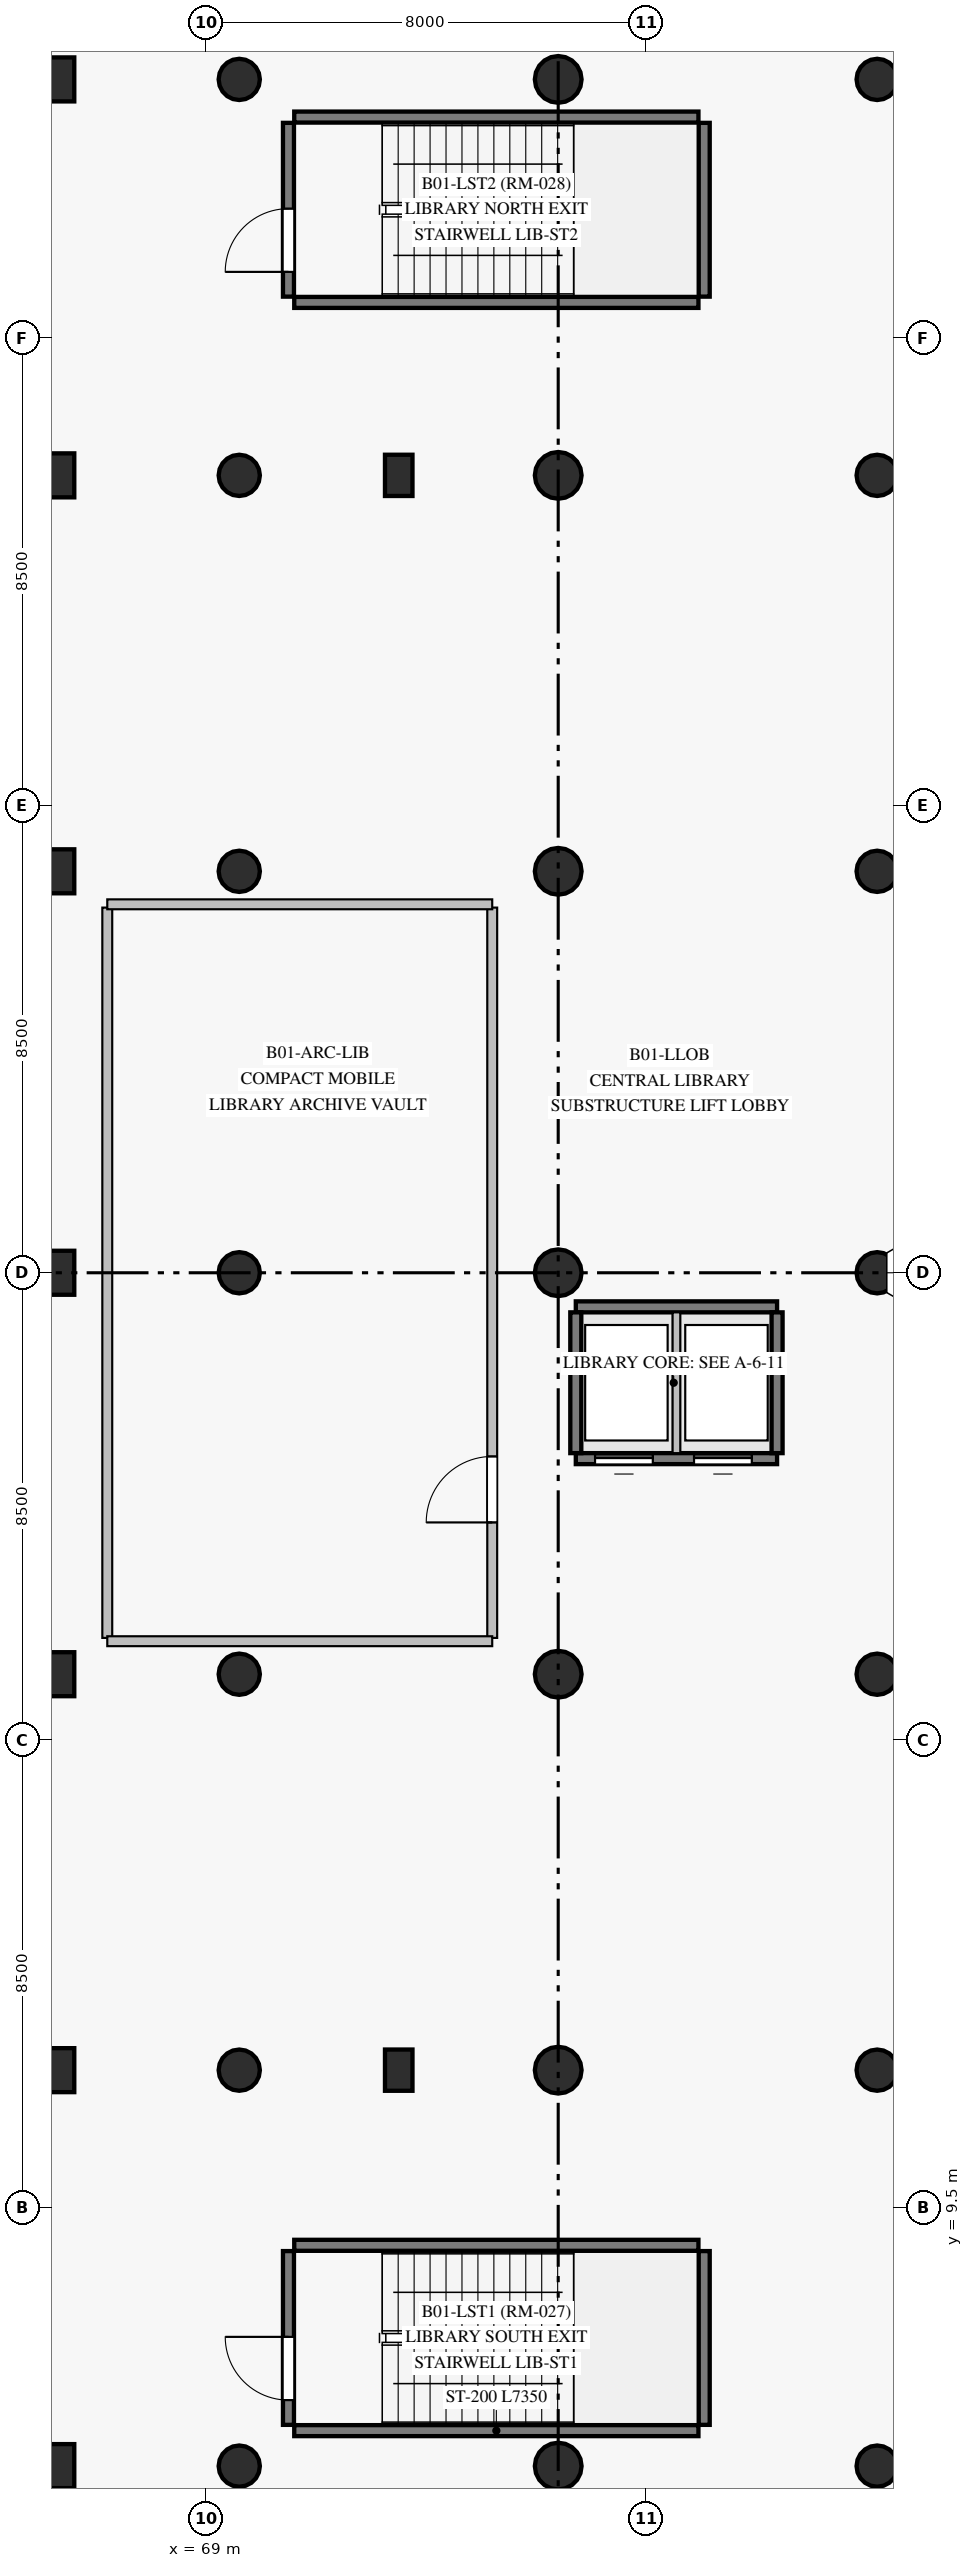
"""IFC4 building model, lengths in metres.
Left out: names, types, materials, properties, quantities, classifications, styles, units other than length and angle.
Written with IfcOpenShell. Run it as: python <this file> out.ifc"""

import sys

from ifc_helpers import new_model, si_unit, direction, frame, frame_2d, origin, origin_with_axes, origin_2d, place, context, subcontext, project, spatial, rectangle, circle, extrude, source, transform, mapped, element, fill, save


model = new_model("IFC4")
c1 = context("Model", 3, precision=1e-05, world=origin(), true_north=direction((0.0, 1.0)))
c2 = subcontext(c1, "Body", "Model", "MODEL_VIEW")
j1 = project(units=[si_unit("LENGTHUNIT", "METRE"), si_unit("PLANEANGLEUNIT", "RADIAN")], contexts=[c1])
p1 = place(None, origin())
s1 = spatial("IfcSite", under=j1, at=p1, CompositionType="ELEMENT")
p2 = place(p1, origin())
s2 = spatial("IfcBuilding", under=s1, at=p2, CompositionType="ELEMENT")
p3 = place(p2, frame((0.0, 0.0, -4.2)))
s3 = spatial("IfcBuildingStorey", under=s2, at=p3, CompositionType="ELEMENT", Elevation=-4.2)
m1 = source(origin_with_axes(), c2, "Body", "SweptSolid", [
    extrude(circle(Radius=0.375, at=origin_2d()), origin(), (0.0, 0.0, 1.0), 4.2),
])
for number, where, z_axis, x_axis in (
    (1, (69.6, 4.8, 0.0), (0.0, 0.0, 1.0), (1.0, 0.0, 0.0)),
    (2, (69.6, 12.0, 0.0), (0.0, 0.0, 1.0), (1.0, 0.0, 0.0)),
    (3, (69.6, 19.2, 0.0), (0.0, 0.0, 1.0), (1.0, 0.0, 0.0)),
    (4, (69.6, 26.5, 0.0), (0.0, 0.0, 1.0), (1.0, 0.0, 0.0)),
    (5, (69.6, 33.8, 0.0), (0.0, 0.0, 1.0), (1.0, 0.0, 0.0)),
    (6, (69.6, 41.0, 0.0), (0.0, 0.0, 1.0), (1.0, 0.0, 0.0)),
    (7, (69.6, 48.2, 0.0), (0.0, 0.0, 1.0), (1.0, 0.0, 0.0)),
):
    element("IfcColumn", number, at=place(p3, frame(where, z_axis=z_axis, x_axis=x_axis)), inside=s3, PredefinedType="COLUMN", context=c2, shape_type="MappedRepresentation", body=[
        mapped(m1, transform((0.0, 0.0, 0.0), scale=1.0)),
    ])
m2 = source(origin_with_axes(), c2, "Body", "SweptSolid", [
    extrude(circle(Radius=0.425, at=origin_2d()), origin(), (0.0, 0.0, 1.0), 4.2),
])
for number, where, z_axis, x_axis in (
    (8, (75.4, 4.8, 0.0), (0.0, 0.0, 1.0), (1.0, 0.0, 0.0)),
    (9, (75.4, 12.0, 0.0), (0.0, 0.0, 1.0), (1.0, 0.0, 0.0)),
    (10, (75.4, 19.2, 0.0), (0.0, 0.0, 1.0), (1.0, 0.0, 0.0)),
    (11, (75.4, 26.5, 0.0), (0.0, 0.0, 1.0), (1.0, 0.0, 0.0)),
    (12, (75.4, 33.8, 0.0), (0.0, 0.0, 1.0), (1.0, 0.0, 0.0)),
    (13, (75.4, 41.0, 0.0), (0.0, 0.0, 1.0), (1.0, 0.0, 0.0)),
    (14, (75.4, 48.2, 0.0), (0.0, 0.0, 1.0), (1.0, 0.0, 0.0)),
):
    element("IfcColumn", number, at=place(p3, frame(where, z_axis=z_axis, x_axis=x_axis)), inside=s3, PredefinedType="COLUMN", context=c2, shape_type="MappedRepresentation", body=[
        mapped(m2, transform((0.0, 0.0, 0.0), scale=1.0)),
    ])
for number, where, z_axis, x_axis in (
    (15, (81.2, 4.8, 0.0), (0.0, 0.0, 1.0), (1.0, 0.0, 0.0)),
    (16, (81.2, 12.0, 0.0), (0.0, 0.0, 1.0), (1.0, 0.0, 0.0)),
    (17, (81.2, 19.2, 0.0), (0.0, 0.0, 1.0), (1.0, 0.0, 0.0)),
    (18, (81.2, 26.5, 0.0), (0.0, 0.0, 1.0), (1.0, 0.0, 0.0)),
    (19, (81.2, 33.8, 0.0), (0.0, 0.0, 1.0), (1.0, 0.0, 0.0)),
    (20, (81.2, 41.0, 0.0), (0.0, 0.0, 1.0), (1.0, 0.0, 0.0)),
    (21, (81.2, 48.2, 0.0), (0.0, 0.0, 1.0), (1.0, 0.0, 0.0)),
):
    element("IfcColumn", number, at=place(p3, frame(where, z_axis=z_axis, x_axis=x_axis)), inside=s3, PredefinedType="COLUMN", context=c2, shape_type="MappedRepresentation", body=[
        mapped(m1, transform((0.0, 0.0, 0.0), scale=1.0)),
    ])
m3 = source(origin_with_axes(), c2, "Body", "SweptSolid", [
    extrude(rectangle(XDim=0.8, YDim=0.8, at=origin_2d()), origin(), (0.0, 0.0, 1.0), 4.2),
])
for number, where, z_axis, x_axis in (
    (22, (66.2, 4.8, 0.0), (0.0, 0.0, 1.0), (1.0, 0.0, 0.0)),
    (23, (66.2, 12.0, 0.0), (0.0, 0.0, 1.0), (1.0, 0.0, 0.0)),
    (24, (66.2, 19.2, 0.0), (0.0, 0.0, 1.0), (1.0, 0.0, 0.0)),
    (25, (66.2, 26.5, 0.0), (0.0, 0.0, 1.0), (1.0, 0.0, 0.0)),
    (26, (66.2, 33.8, 0.0), (0.0, 0.0, 1.0), (1.0, 0.0, 0.0)),
    (27, (66.2, 41.0, 0.0), (0.0, 0.0, 1.0), (1.0, 0.0, 0.0)),
    (28, (66.2, 48.2, 0.0), (0.0, 0.0, 1.0), (1.0, 0.0, 0.0)),
):
    element("IfcColumn", number, at=place(p3, frame(where, z_axis=z_axis, x_axis=x_axis)), inside=s3, PredefinedType="COLUMN", context=c2, shape_type="MappedRepresentation", body=[
        mapped(m3, transform((0.0, 0.0, 0.0), scale=1.0)),
    ])
m4 = source(origin_with_axes(), c2, "Body", "SweptSolid", [
    extrude(rectangle(XDim=0.5, YDim=0.75, at=origin_2d()), origin(), (0.0, 0.0, 1.0), 4.2),
])
for number, where, z_axis, x_axis in (
    (29, (72.5, 12.0, 0.0), (0.0, 0.0, 1.0), (1.0, 0.0, 0.0)),
    (30, (72.5, 41.0, 0.0), (0.0, 0.0, 1.0), (1.0, 0.0, 0.0)),
):
    element("IfcColumn", number, at=place(p3, frame(where, z_axis=z_axis, x_axis=x_axis)), inside=s3, PredefinedType="PILASTER", context=c2, shape_type="MappedRepresentation", body=[
        mapped(m4, transform((0.0, 0.0, 0.0), scale=1.0)),
    ])
for number, where, z_axis, x_axis in (
    (31, (70.6, 5.445, 0.0), (0.0, 0.0, 1.0), (1.0, 0.0, 0.0)),
    (32, (70.6, 8.815, 0.0), (0.0, 0.0, 1.0), (1.0, 0.0, 0.0)),
    (33, (70.6, 44.145, 0.0), (0.0, 0.0, 1.0), (1.0, 0.0, 0.0)),
    (34, (70.6, 47.515, 0.0), (0.0, 0.0, 1.0), (1.0, 0.0, 0.0)),
):
    element("IfcWall", number, at=place(p3, frame(where, z_axis=z_axis, x_axis=x_axis)), inside=s3, PredefinedType="SHEAR", context=c2, shape_type="SweptSolid", body=[
        extrude(rectangle(XDim=7.35, YDim=0.2, at=frame_2d((3.675, 0.0))), origin(), (0.0, 0.0, 1.0), 3.85),
    ])
p4 = place(p3, frame((75.72, 23.12, 0.0), z_axis=(0.0, 0.0, 1.0), x_axis=(1.0, 0.0, 0.0)))
e35 = element("IfcWall", 35, at=p4, inside=s3, PredefinedType="SHEAR", context=c2, shape_type="SweptSolid", body=[
    extrude(rectangle(XDim=3.66, YDim=0.2, at=frame_2d((1.83, 0.0))), origin(), (0.0, 0.0, 1.0), 3.85),
])
p5 = place(p4, frame((0.35, 0.0, 0.0)))
e36 = element("IfcOpeningElement", 36, at=p5, cuts=e35, PredefinedType="OPENING", context=c2, shape_type="SweptSolid", body=[
    extrude(rectangle(XDim=1.05, YDim=2.15, at=frame_2d((0.525, 1.075))), frame((0.0, 0.11, 0.0), z_axis=(0.0, -1.0, 0.0), x_axis=(1.0, 0.0, 0.0)), (0.0, 0.0, 1.0), 0.22),
])
p6 = place(p4, frame((2.15, 0.0, 0.0)))
e37 = element("IfcOpeningElement", 37, at=p6, cuts=e35, PredefinedType="OPENING", context=c2, shape_type="SweptSolid", body=[
    extrude(rectangle(XDim=1.05, YDim=2.15, at=frame_2d((0.525, 1.075))), frame((0.0, 0.11, 0.0), z_axis=(0.0, -1.0, 0.0), x_axis=(1.0, 0.0, 0.0)), (0.0, 0.0, 1.0), 0.22),
])
p7 = place(p3, frame((75.72, 25.88, 0.0), z_axis=(0.0, 0.0, 1.0), x_axis=(1.0, 0.0, 0.0)))
e38 = element("IfcWall", 38, at=p7, inside=s3, PredefinedType="SHEAR", context=c2, shape_type="SweptSolid", body=[
    extrude(rectangle(XDim=3.66, YDim=0.2, at=frame_2d((1.83, 0.0))), origin(), (0.0, 0.0, 1.0), 3.85),
])
p8 = place(p3, frame((70.495, 5.55, 0.0), z_axis=(0.0, 0.0, 1.0), x_axis=(0.0, 1.0, 0.0)))
e39 = element("IfcWall", 39, at=p8, inside=s3, PredefinedType="SHEAR", context=c2, shape_type="SweptSolid", body=[
    extrude(rectangle(XDim=3.16, YDim=0.2, at=frame_2d((1.58, 0.0))), origin(), (0.0, 0.0, 1.0), 3.85),
])
p9 = place(p8, frame((0.45, 0.0, 0.0)))
e40 = element("IfcOpeningElement", 40, at=p9, cuts=e39, PredefinedType="OPENING", context=c2, shape_type="SweptSolid", body=[
    extrude(rectangle(XDim=1.15, YDim=2.15, at=frame_2d((0.575, 1.075))), frame((0.0, 0.11, 0.0), z_axis=(0.0, -1.0, 0.0), x_axis=(1.0, 0.0, 0.0)), (0.0, 0.0, 1.0), 0.22),
])
p10 = place(p3, frame((78.055, 5.55, 0.0), z_axis=(0.0, 0.0, 1.0), x_axis=(0.0, 1.0, 0.0)))
e41 = element("IfcWall", 41, at=p10, inside=s3, PredefinedType="SHEAR", context=c2, shape_type="SweptSolid", body=[
    extrude(rectangle(XDim=3.16, YDim=0.2, at=frame_2d((1.58, 0.0))), origin(), (0.0, 0.0, 1.0), 3.85),
])
p11 = place(p3, frame((70.495, 44.25, 0.0), z_axis=(0.0, 0.0, 1.0), x_axis=(0.0, 1.0, 0.0)))
e42 = element("IfcWall", 42, at=p11, inside=s3, PredefinedType="SHEAR", context=c2, shape_type="SweptSolid", body=[
    extrude(rectangle(XDim=3.16, YDim=0.2, at=frame_2d((1.58, 0.0))), origin(), (0.0, 0.0, 1.0), 3.85),
])
p12 = place(p11, frame((0.45, 0.0, 0.0)))
e43 = element("IfcOpeningElement", 43, at=p12, cuts=e42, PredefinedType="OPENING", context=c2, shape_type="SweptSolid", body=[
    extrude(rectangle(XDim=1.15, YDim=2.15, at=frame_2d((0.575, 1.075))), frame((0.0, 0.11, 0.0), z_axis=(0.0, -1.0, 0.0), x_axis=(1.0, 0.0, 0.0)), (0.0, 0.0, 1.0), 0.22),
])
p13 = place(p3, frame((78.055, 44.25, 0.0), z_axis=(0.0, 0.0, 1.0), x_axis=(0.0, 1.0, 0.0)))
e44 = element("IfcWall", 44, at=p13, inside=s3, PredefinedType="SHEAR", context=c2, shape_type="SweptSolid", body=[
    extrude(rectangle(XDim=3.16, YDim=0.2, at=frame_2d((1.58, 0.0))), origin(), (0.0, 0.0, 1.0), 3.85),
])
for number, where, z_axis, x_axis in (
    (45, (75.72, 23.22, 0.0), (0.0, 0.0, 1.0), (0.0, 1.0, 0.0)),
    (46, (79.38, 23.22, 0.0), (0.0, 0.0, 1.0), (0.0, 1.0, 0.0)),
):
    element("IfcWall", number, at=place(p3, frame(where, z_axis=z_axis, x_axis=x_axis)), inside=s3, PredefinedType="SHEAR", context=c2, shape_type="SweptSolid", body=[
        extrude(rectangle(XDim=2.56, YDim=0.2, at=frame_2d((1.28, 0.0))), origin(), (0.0, 0.0, 1.0), 3.85),
    ])
p14 = place(p3, frame((67.2, 19.86, 0.0), z_axis=(0.0, 0.0, 1.0), x_axis=(0.0, 1.0, 0.0)))
e47 = element("IfcWall", 47, at=p14, inside=s3, PredefinedType="PARTITIONING", context=c2, shape_type="SweptSolid", body=[
    extrude(rectangle(XDim=13.28, YDim=0.18, at=frame_2d((6.64, 0.0))), origin(), (0.0, 0.0, 1.0), 3.85),
])
p15 = place(p3, frame((74.2, 19.86, 0.0), z_axis=(0.0, 0.0, 1.0), x_axis=(0.0, 1.0, 0.0)))
e48 = element("IfcWall", 48, at=p15, inside=s3, PredefinedType="PARTITIONING", context=c2, shape_type="SweptSolid", body=[
    extrude(rectangle(XDim=13.28, YDim=0.18, at=frame_2d((6.64, 0.0))), origin(), (0.0, 0.0, 1.0), 3.85),
])
p16 = place(p15, frame((2.1, 0.0, 0.0)))
e49 = element("IfcOpeningElement", 49, at=p16, cuts=e48, PredefinedType="OPENING", context=c2, shape_type="SweptSolid", body=[
    extrude(rectangle(XDim=1.2, YDim=2.15, at=frame_2d((0.6, 1.075))), frame((0.0, 0.1, 0.0), z_axis=(0.0, -1.0, 0.0), x_axis=(1.0, 0.0, 0.0)), (0.0, 0.0, 1.0), 0.2),
])
for number, where, z_axis, x_axis in (
    (50, (67.2, 33.2, 0.0), (0.0, 0.0, 1.0), (1.0, 0.0, 0.0)),
    (51, (67.2, 19.8, 0.0), (0.0, 0.0, 1.0), (1.0, 0.0, 0.0)),
):
    element("IfcWall", number, at=place(p3, frame(where, z_axis=z_axis, x_axis=x_axis)), inside=s3, PredefinedType="PARTITIONING", context=c2, shape_type="SweptSolid", body=[
        extrude(rectangle(XDim=7.0, YDim=0.18, at=frame_2d((3.5, 0.0))), origin(), (0.0, 0.0, 1.0), 3.2),
    ])
p17 = place(p3, frame((77.55, 23.22, 0.0), z_axis=(0.0, 0.0, 1.0), x_axis=(0.0, 1.0, 0.0)))
e52 = element("IfcWall", 52, at=p17, inside=s3, PredefinedType="PARTITIONING", context=c2, shape_type="SweptSolid", body=[
    extrude(rectangle(XDim=2.56, YDim=0.14, at=frame_2d((1.28, 0.0))), origin(), (0.0, 0.0, 1.0), 3.85),
])
m5 = source(origin_with_axes(), c2, "Body", "SweptSolid", [
    extrude(rectangle(XDim=1.2, YDim=2.15, at=frame_2d((0.6, 1.075))), frame((0.0, 0.025, 0.0), z_axis=(0.0, -1.0, 0.0), x_axis=(1.0, 0.0, 0.0)), (0.0, 0.0, 1.0), 0.05),
])
p18 = place(p16, origin())
e53 = element("IfcDoor", 53, at=p18, inside=s3, OperationType="SINGLE_SWING_LEFT", PredefinedType="DOOR", context=c2, shape_type="MappedRepresentation", body=[
    mapped(m5, transform((0.0, 0.0, 0.0), scale=1.0)),
])
fill(e49, e53)
m6 = source(origin_with_axes(), c2, "Body", "SweptSolid", [
    extrude(rectangle(XDim=1.15, YDim=2.15, at=frame_2d((0.575, 1.075))), frame((0.0, 0.025, 0.0), z_axis=(0.0, -1.0, 0.0), x_axis=(1.0, 0.0, 0.0)), (0.0, 0.0, 1.0), 0.05),
])
p19 = place(p9, origin())
e54 = element("IfcDoor", 54, at=p19, inside=s3, OperationType="SINGLE_SWING_RIGHT", PredefinedType="DOOR", context=c2, shape_type="MappedRepresentation", body=[
    mapped(m6, transform((0.0, 0.0, 0.0), scale=1.0)),
])
fill(e40, e54)
p20 = place(p12, origin())
e55 = element("IfcDoor", 55, at=p20, inside=s3, OperationType="SINGLE_SWING_LEFT", PredefinedType="DOOR", context=c2, shape_type="MappedRepresentation", body=[
    mapped(m6, transform((0.0, 0.0, 0.0), scale=1.0)),
])
fill(e43, e55)
m7 = source(origin_with_axes(), c2, "Body", "SweptSolid", [
    extrude(rectangle(XDim=1.05, YDim=2.15, at=frame_2d((0.525, 1.075))), frame((0.0, 0.025, 0.0), z_axis=(0.0, -1.0, 0.0), x_axis=(1.0, 0.0, 0.0)), (0.0, 0.0, 1.0), 0.05),
])
p21 = place(p5, origin())
e56 = element("IfcDoor", 56, at=p21, inside=s3, OperationType="SLIDING_TO_LEFT", PredefinedType="DOOR", context=c2, shape_type="MappedRepresentation", body=[
    mapped(m7, transform((0.0, 0.0, 0.0), scale=1.0)),
])
fill(e36, e56)
p22 = place(p6, origin())
e57 = element("IfcDoor", 57, at=p22, inside=s3, OperationType="SLIDING_TO_RIGHT", PredefinedType="DOOR", context=c2, shape_type="MappedRepresentation", body=[
    mapped(m7, transform((0.0, 0.0, 0.0), scale=1.0)),
])
fill(e37, e57)
save(model, sys.argv[1])
